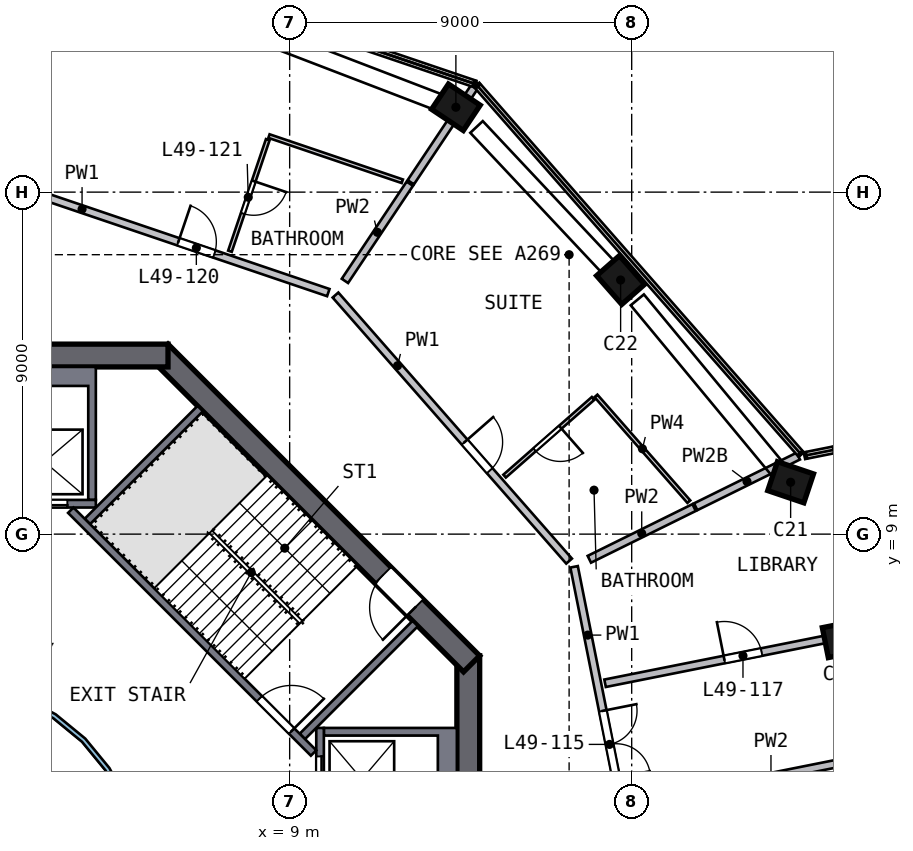
"""IFC4 building model, lengths in metres.
Left out: names, types, materials, properties, quantities, classifications, styles, units other than length and angle.
Written with IfcOpenShell. Run it as: python <this file> out.ifc"""

import sys

from ifc_helpers import new_model, si_unit, direction, frame, frame_2d, origin, origin_2d, place, context, subcontext, project, spatial, polyline, rectangle, outline, extrude, element, fill, save


model = new_model("IFC4")
c1 = context("Model", 3, precision=1e-05, world=origin(), true_north=direction((0.0, 1.0)))
c2 = subcontext(c1, "Body", "Model", "MODEL_VIEW")
j1 = project(units=[si_unit("LENGTHUNIT", "METRE"), si_unit("PLANEANGLEUNIT", "RADIAN")], contexts=[c1])
p1 = place(None, origin())
s1 = spatial("IfcSite", under=j1, at=p1, CompositionType="ELEMENT")
p2 = place(p1, origin())
s2 = spatial("IfcBuilding", under=s1, at=p2, CompositionType="ELEMENT")
p3 = place(p2, frame((0.0, 0.0, 201.0)))
s3 = spatial("IfcBuildingStorey", under=s2, at=p3, CompositionType="ELEMENT", Elevation=201.0)
p4 = place(p3, frame((22.229, 10.266, 0.0), z_axis=(-0.038762421, 0.08210902, 0.99586926), x_axis=(0.946547309, -0.316367479, 0.062927024)))
e1 = element("IfcColumn", 1, at=p4, inside=s3, PredefinedType="COLUMN", context=c2, shape_type="SweptSolid", body=[
    extrude(rectangle(XDim=1.0, YDim=0.8, at=origin_2d()), origin(), (0.0, 0.0, 1.0), 4.207),
])
p5 = place(p3, frame((17.779, 15.608, 0.0), z_axis=(-0.058449937, 0.065415172, 0.996144799), x_axis=(-0.65742794, 0.748393953, -0.087721123)))
e2 = element("IfcColumn", 2, at=p5, inside=s3, PredefinedType="COLUMN", context=c2, shape_type="SweptSolid", body=[
    extrude(rectangle(XDim=1.0, YDim=0.8, at=origin_2d()), origin(), (0.0, 0.0, 1.0), 4.206),
])
p6 = place(p3, frame((13.465, 20.174, 0.0), z_axis=(-0.075209821, 0.049269396, 0.995949803), x_axis=(0.828464484, -0.552777696, 0.089907833)))
e3 = element("IfcColumn", 3, at=p6, inside=s3, PredefinedType="COLUMN", context=c2, shape_type="SweptSolid", body=[
    extrude(rectangle(XDim=1.0, YDim=0.8, at=origin_2d()), origin(), (0.0, 0.0, 1.0), 4.207),
])
p7 = place(p3, frame((23.516, 6.118, 0.0), z_axis=(-0.02338665, 0.086989054, 0.995934721), x_axis=(0.980612873, 0.195865659, 0.005919145)))
e4 = element("IfcColumn", 4, at=p7, inside=s3, PredefinedType="COLUMN", context=c2, shape_type="SweptSolid", body=[
    extrude(rectangle(XDim=0.8, YDim=0.8, at=origin_2d()), origin(), (0.0, 0.0, 1.0), 4.207),
])
p8 = place(p3, frame((13.7, -5.799, 0.0), z_axis=(0.0, 0.0, 1.0), x_axis=(0.0, 1.0, 0.0)))
e5 = element("IfcWall", 5, at=p8, inside=s3, PredefinedType="SHEAR", context=c2, shape_type="SweptSolid", body=[
    extrude(rectangle(XDim=11.598, YDim=0.6, at=frame_2d((5.799, 0.0))), origin(), (0.0, 0.0, 1.0), 4.5),
])
p9 = place(p8, frame((4.899, 0.0, 0.0)))
e6 = element("IfcOpeningElement", 6, at=p9, cuts=e5, PredefinedType="OPENING", context=c2, shape_type="SweptSolid", body=[
    extrude(rectangle(XDim=1.8, YDim=2.1, at=frame_2d((0.9, 1.05))), frame((0.0, 0.31, 0.0), z_axis=(0.0, -1.0, 0.0), x_axis=(1.0, 0.0, 0.0)), (0.0, 0.0, 1.0), 0.62),
])
p10 = place(p3, frame((13.788, 5.587, 0.0), z_axis=(0.0, 0.0, 1.0), x_axis=(-0.707106781, 0.707106781, 0.0)))
e7 = element("IfcWall", 7, at=p10, inside=s3, PredefinedType="SHEAR", context=c2, shape_type="SweptSolid", body=[
    extrude(rectangle(XDim=11.598, YDim=0.6, at=frame_2d((5.799, 0.0))), origin(), (0.0, 0.0, 1.0), 4.5),
])
p11 = place(p10, frame((2.099, 0.0, 0.0)))
e8 = element("IfcOpeningElement", 8, at=p11, cuts=e7, PredefinedType="OPENING", context=c2, shape_type="SweptSolid", body=[
    extrude(rectangle(XDim=1.2, YDim=2.1, at=frame_2d((0.6, 1.05))), frame((0.0, 0.31, 0.0), z_axis=(0.0, -1.0, 0.0), x_axis=(1.0, 0.0, 0.0)), (0.0, 0.0, 1.0), 0.62),
])
p12 = place(p3, frame((5.799, 13.7, 0.0), z_axis=(0.0, 0.0, 1.0), x_axis=(-1.0, 0.0, 0.0)))
e9 = element("IfcWall", 9, at=p12, inside=s3, PredefinedType="SHEAR", context=c2, shape_type="SweptSolid", body=[
    extrude(rectangle(XDim=11.598, YDim=0.6, at=frame_2d((5.799, 0.0))), origin(), (0.0, 0.0, 1.0), 4.5),
])
p13 = place(p12, frame((4.899, 0.0, 0.0)))
e10 = element("IfcOpeningElement", 10, at=p13, cuts=e9, PredefinedType="OPENING", context=c2, shape_type="SweptSolid", body=[
    extrude(rectangle(XDim=1.8, YDim=2.1, at=frame_2d((0.9, 1.05))), frame((0.0, 0.31, 0.0), z_axis=(0.0, -1.0, 0.0), x_axis=(1.0, 0.0, 0.0)), (0.0, 0.0, 1.0), 0.62),
])
p14 = place(p3, origin())
e11 = element("IfcWall", 11, at=p14, inside=s3, PredefinedType="SOLIDWALL", context=c2, shape_type="SweptSolid", body=[
    extrude(outline(polyline([(13.4, 3.9), (13.4, 1.2), (9.9, 1.2), (9.9, 1.4), (12.9, 1.4), (12.9, 3.7), (9.9, 3.7), (9.9, 3.9), (13.4, 3.9)])), origin(), (0.0, 0.0, 1.0), 4.19),
])
p15 = place(p3, frame((9.8, 1.2, 0.0), z_axis=(0.0, 0.0, 1.0), x_axis=(0.0, 1.0, 0.0)))
e12 = element("IfcWall", 12, at=p15, inside=s3, PredefinedType="SOLIDWALL", context=c2, shape_type="SweptSolid", body=[
    extrude(rectangle(XDim=2.7, YDim=0.2, at=frame_2d((1.35, 0.0))), origin(), (0.0, 0.0, 1.0), 4.19),
])
p16 = place(p15, frame((0.75, 0.0, 0.0)))
e13 = element("IfcOpeningElement", 13, at=p16, cuts=e12, PredefinedType="OPENING", context=c2, shape_type="SweptSolid", body=[
    extrude(rectangle(XDim=1.2, YDim=2.1, at=frame_2d((0.6, 1.05))), frame((0.0, 0.11, 0.0), z_axis=(0.0, -1.0, 0.0), x_axis=(1.0, 0.0, 0.0)), (0.0, 0.0, 1.0), 0.22),
])
p17 = place(p3, origin())
e14 = element("IfcWall", 14, at=p17, inside=s3, PredefinedType="SOLIDWALL", context=c2, shape_type="SweptSolid", body=[
    extrude(outline(polyline([(3.9, 9.9), (3.7, 9.9), (3.7, 12.9), (1.4, 12.9), (1.4, 9.9), (1.2, 9.9), (1.2, 13.4), (3.9, 13.4), (3.9, 9.9)])), origin(), (0.0, 0.0, 1.0), 4.19),
])
p18 = place(p3, frame((1.2, 9.8, 0.0), z_axis=(0.0, 0.0, 1.0), x_axis=(1.0, 0.0, 0.0)))
e15 = element("IfcWall", 15, at=p18, inside=s3, PredefinedType="SOLIDWALL", context=c2, shape_type="SweptSolid", body=[
    extrude(rectangle(XDim=2.7, YDim=0.2, at=frame_2d((1.35, 0.0))), origin(), (0.0, 0.0, 1.0), 4.19),
])
p19 = place(p18, frame((0.75, 0.0, 0.0)))
e16 = element("IfcOpeningElement", 16, at=p19, cuts=e15, PredefinedType="OPENING", context=c2, shape_type="SweptSolid", body=[
    extrude(rectangle(XDim=1.2, YDim=2.1, at=frame_2d((0.6, 1.05))), frame((0.0, 0.11, 0.0), z_axis=(0.0, -1.0, 0.0), x_axis=(1.0, 0.0, 0.0)), (0.0, 0.0, 1.0), 0.22),
])
p20 = place(p3, frame((3.24, 9.629, 0.0), z_axis=(0.0, 0.0, 1.0), x_axis=(0.707106781, -0.707106781, 0.0)))
e17 = element("IfcWall", 17, at=p20, inside=s3, PredefinedType="SOLIDWALL", context=c2, shape_type="SweptSolid", body=[
    extrude(rectangle(XDim=9.036, YDim=0.2, at=frame_2d((4.518, 0.0))), origin(), (0.0, 0.0, 1.0), 4.19),
])
p21 = place(p20, frame((7.018, 0.0, 0.0)))
e18 = element("IfcOpeningElement", 18, at=p21, cuts=e17, PredefinedType="OPENING", context=c2, shape_type="SweptSolid", body=[
    extrude(rectangle(XDim=1.2, YDim=2.1, at=frame_2d((0.6, 1.05))), frame((0.0, 0.11, 0.0), z_axis=(0.0, -1.0, 0.0), x_axis=(1.0, 0.0, 0.0)), (0.0, 0.0, 1.0), 0.22),
])
for number, where, z_axis, x_axis in (
    (19, (9.334, 3.677, 0.0), (0.0, 0.0, 1.0), (0.707, 0.707, 0.0)),
    (20, (3.677, 9.334, 0.0), (0.0, 0.0, 1.0), (0.707, 0.707, 0.0)),
):
    element("IfcWall", number, at=place(p3, frame(where, z_axis=z_axis, x_axis=x_axis)), inside=s3, PredefinedType="SOLIDWALL", context=c2, shape_type="SweptSolid", body=[
        extrude(rectangle(XDim=4.2, YDim=0.2, at=frame_2d((2.1, 0.0))), origin(), (0.0, 0.0, 1.0), 4.19),
    ])
p22 = place(p3, origin())
e21 = element("IfcWall", 21, at=p22, inside=s3, PredefinedType="SOLIDWALL", context=c2, shape_type="SweptSolid", body=[
    extrude(outline(polyline([(5.021, -0.999), (4.73, -1.959), (4.257, -2.844), (3.62, -3.62), (2.844, -4.257), (1.959, -4.73), (0.999, -5.021), (0.0, -5.12), (-0.999, -5.021), (-1.959, -4.73), (-2.844, -4.257), (-3.62, -3.62), (-4.257, -2.844), (-4.73, -1.959), (-5.021, -0.999), (-5.12, 0.0), (-5.021, 0.999), (-4.73, 1.959), (-4.257, 2.844), (-3.62, 3.62), (-2.844, 4.257), (-1.959, 4.73), (-0.999, 5.021), (0.0, 5.12), (0.999, 5.021), (1.959, 4.73), (2.844, 4.257), (3.62, 3.62), (4.257, 2.844), (4.73, 1.959), (5.021, 0.999), (5.12, 0.0), (5.021, -0.999)]), holes=[polyline([(4.904, 0.976), (4.619, 1.913), (4.157, 2.778), (3.535, 3.535), (2.778, 4.157), (1.913, 4.619), (0.976, 4.904), (0.0, 5.0), (-0.976, 4.904), (-1.913, 4.619), (-2.778, 4.157), (-3.535, 3.535), (-4.157, 2.778), (-4.619, 1.913), (-4.904, 0.976), (-5.0, 0.0), (-4.904, -0.976), (-4.619, -1.913), (-4.157, -2.778), (-3.535, -3.535), (-2.778, -4.157), (-1.913, -4.619), (-0.976, -4.904), (0.0, -5.0), (0.976, -4.904), (1.913, -4.619), (2.778, -4.157), (3.535, -3.535), (4.157, -2.778), (4.619, -1.913), (4.904, -0.976), (5.0, 0.0), (4.904, 0.976)])]), origin(), (0.0, 0.0, 1.0), 4.19),
])
p23 = place(p3, frame((1.193, 18.346, 0.0), z_axis=(0.0, 0.0, 1.0), x_axis=(0.947096531, -0.320948844, 0.0)))
e22 = element("IfcWall", 22, at=p23, inside=s3, PredefinedType="SOLIDWALL", context=c2, shape_type="SweptSolid", body=[
    extrude(rectangle(XDim=9.316, YDim=0.2, at=frame_2d((4.658, 0.0))), origin(), (0.0, 0.0, 1.0), 4.19),
])
p24 = place(p23, frame((5.15, 0.0, 0.0)))
e23 = element("IfcOpeningElement", 23, at=p24, cuts=e22, PredefinedType="OPENING", context=c2, shape_type="SweptSolid", body=[
    extrude(rectangle(XDim=1.0, YDim=2.1, at=frame_2d((0.5, 1.05))), frame((0.0, 0.11, 0.0), z_axis=(0.0, -1.0, 0.0), x_axis=(1.0, 0.0, 0.0)), (0.0, 0.0, 1.0), 0.22),
])
p25 = place(p3, frame((10.206, 15.292, 0.0), z_axis=(0.0, 0.0, 1.0), x_axis=(0.659731878, -0.751501064, 0.0)))
e24 = element("IfcWall", 24, at=p25, inside=s3, PredefinedType="SOLIDWALL", context=c2, shape_type="SweptSolid", body=[
    extrude(rectangle(XDim=9.317, YDim=0.2, at=frame_2d((4.658, 0.0))), origin(), (0.0, 0.0, 1.0), 4.19),
])
p26 = place(p25, frame((5.15, 0.0, 0.0)))
e25 = element("IfcOpeningElement", 25, at=p26, cuts=e24, PredefinedType="OPENING", context=c2, shape_type="SweptSolid", body=[
    extrude(rectangle(XDim=1.0, YDim=2.1, at=frame_2d((0.5, 1.05))), frame((0.0, 0.11, 0.0), z_axis=(0.0, -1.0, 0.0), x_axis=(1.0, 0.0, 0.0)), (0.0, 0.0, 1.0), 0.22),
])
p27 = place(p3, frame((16.485, 8.14, 0.0), z_axis=(0.0, 0.0, 1.0), x_axis=(0.195597039, -0.980684352, 0.0)))
e26 = element("IfcWall", 26, at=p27, inside=s3, PredefinedType="SOLIDWALL", context=c2, shape_type="SweptSolid", body=[
    extrude(rectangle(XDim=9.316, YDim=0.2, at=frame_2d((4.658, 0.0))), origin(), (0.0, 0.0, 1.0), 4.19),
])
p28 = place(p27, frame((3.865, 0.0, 0.0)))
e27 = element("IfcOpeningElement", 27, at=p28, cuts=e26, PredefinedType="OPENING", context=c2, shape_type="SweptSolid", body=[
    extrude(rectangle(XDim=1.8, YDim=2.1, at=frame_2d((0.9, 1.05))), frame((0.0, 0.11, 0.0), z_axis=(0.0, -1.0, 0.0), x_axis=(1.0, 0.0, 0.0)), (0.0, 0.0, 1.0), 0.22),
])
p29 = place(p3, frame((10.454, 15.664, 0.0), z_axis=(0.0, 0.0, 1.0), x_axis=(0.555121583, 0.831769215, 0.0)))
e28 = element("IfcWall", 28, at=p29, inside=s3, PredefinedType="SOLIDWALL", context=c2, shape_type="SweptSolid", body=[
    extrude(rectangle(XDim=3.075, YDim=0.2, at=frame_2d((1.537, 0.0))), origin(), (0.0, 0.0, 1.0), 4.19),
])
p30 = place(p3, frame((12.187, 18.259, 0.0), z_axis=(0.0, 0.0, 1.0), x_axis=(0.555093017, 0.83178828, 0.0)))
e29 = element("IfcWall", 29, at=p30, inside=s3, PredefinedType="SOLIDWALL", context=c2, shape_type="SweptSolid", body=[
    extrude(rectangle(XDim=3.011, YDim=0.2, at=frame_2d((1.506, 0.0))), origin(), (0.0, 0.0, 1.0), 4.19),
])
p31 = place(p3, frame((16.885, 8.338, 0.0), z_axis=(0.0, 0.0, 1.0), x_axis=(0.896623517, 0.442793709, 0.0)))
e30 = element("IfcWall", 30, at=p31, inside=s3, PredefinedType="SOLIDWALL", context=c2, shape_type="SweptSolid", body=[
    extrude(rectangle(XDim=3.075, YDim=0.2, at=frame_2d((1.538, 0.0))), origin(), (0.0, 0.0, 1.0), 4.19),
])
p32 = place(p3, frame((19.684, 9.72, 0.0), z_axis=(0.0, 0.0, 1.0), x_axis=(0.896653576, 0.442732837, 0.0)))
e31 = element("IfcWall", 31, at=p32, inside=s3, PredefinedType="SOLIDWALL", context=c2, shape_type="SweptSolid", body=[
    extrude(rectangle(XDim=3.011, YDim=0.2, at=frame_2d((1.506, 0.0))), origin(), (0.0, 0.0, 1.0), 3.69),
])
p33 = place(p3, frame((17.3, 5.075, 0.0), z_axis=(0.0, 0.0, 1.0), x_axis=(0.98068274, 0.195605123, 0.0)))
e32 = element("IfcWall", 32, at=p33, inside=s3, PredefinedType="SOLIDWALL", context=c2, shape_type="SweptSolid", body=[
    extrude(rectangle(XDim=10.75, YDim=0.2, at=frame_2d((5.375, 0.0))), origin(), (0.0, 0.0, 1.0), 4.19),
])
p34 = place(p33, frame((3.2, 0.0, 0.0)))
e33 = element("IfcOpeningElement", 33, at=p34, cuts=e32, PredefinedType="OPENING", context=c2, shape_type="SweptSolid", body=[
    extrude(rectangle(XDim=1.0, YDim=2.1, at=frame_2d((0.5, 1.05))), frame((0.0, 0.11, 0.0), z_axis=(0.0, -1.0, 0.0), x_axis=(1.0, 0.0, 0.0)), (0.0, 0.0, 1.0), 0.22),
])
p35 = place(p3, frame((28.481, 3.976, 0.0), z_axis=(0.0, 0.0, 1.0), x_axis=(-0.980677514, -0.195631322, 0.0)))
e34 = element("IfcWall", 34, at=p35, inside=s3, PredefinedType="SOLIDWALL", context=c2, shape_type="SweptSolid", body=[
    extrude(rectangle(XDim=10.75, YDim=0.2, at=frame_2d((5.375, 0.0))), origin(), (0.0, 0.0, 1.0), 4.19),
])
p36 = place(p35, frame((1.95, 0.0, 0.0)))
e35 = element("IfcOpeningElement", 35, at=p36, cuts=e34, PredefinedType="OPENING", context=c2, shape_type="SweptSolid", body=[
    extrude(rectangle(XDim=1.0, YDim=2.1, at=frame_2d((0.5, 1.05))), frame((0.0, 0.11, 0.0), z_axis=(0.0, -1.0, 0.0), x_axis=(1.0, 0.0, 0.0)), (0.0, 0.0, 1.0), 0.22),
])
p37 = place(p3, frame((8.424, 19.38, 0.0), z_axis=(0.0, 0.0, 1.0), x_axis=(-0.320949479, -0.947096316, 0.0)))
e36 = element("IfcWall", 36, at=p37, inside=s3, PredefinedType="PARTITIONING", context=c2, shape_type="SweptSolid", body=[
    extrude(rectangle(XDim=3.1, YDim=0.1, at=frame_2d((1.55, 0.0))), origin(), (0.0, 0.0, 1.0), 4.19),
])
p38 = place(p37, frame((1.15, 0.0, 0.0)))
e37 = element("IfcOpeningElement", 37, at=p38, cuts=e36, PredefinedType="OPENING", context=c2, shape_type="SweptSolid", body=[
    extrude(rectangle(XDim=0.9, YDim=2.1, at=frame_2d((0.45, 1.05))), frame((0.0, 0.06, 0.0), z_axis=(0.0, -1.0, 0.0), x_axis=(1.0, 0.0, 0.0)), (0.0, 0.0, 1.0), 0.12),
])
p39 = place(p3, frame((8.456, 19.475, 0.0), z_axis=(0.0, 0.0, 1.0), x_axis=(0.947109685, -0.320910025, 0.0)))
e38 = element("IfcWall", 38, at=p39, inside=s3, PredefinedType="PARTITIONING", context=c2, shape_type="SweptSolid", body=[
    extrude(rectangle(XDim=3.704, YDim=0.1, at=frame_2d((1.852, 0.0))), origin(), (0.0, 0.0, 1.0), 4.19),
])
p40 = place(p3, frame((16.985, 12.572, 0.0), z_axis=(0.0, 0.0, 1.0), x_axis=(-0.75152688, -0.65970247, 0.0)))
e39 = element("IfcWall", 39, at=p40, inside=s3, PredefinedType="PARTITIONING", context=c2, shape_type="SweptSolid", body=[
    extrude(rectangle(XDim=3.1, YDim=0.1, at=frame_2d((1.55, 0.0))), origin(), (0.0, 0.0, 1.0), 4.19),
])
p41 = place(p40, frame((1.15, 0.0, 0.0)))
e40 = element("IfcOpeningElement", 40, at=p41, cuts=e39, PredefinedType="OPENING", context=c2, shape_type="SweptSolid", body=[
    extrude(rectangle(XDim=0.9, YDim=2.1, at=frame_2d((0.45, 1.05))), frame((0.0, 0.06, 0.0), z_axis=(0.0, -1.0, 0.0), x_axis=(1.0, 0.0, 0.0)), (0.0, 0.0, 1.0), 0.12),
])
p42 = place(p3, frame((17.06, 12.638, 0.0), z_axis=(0.0, 0.0, 1.0), x_axis=(0.659744893, -0.751489638, 0.0)))
e41 = element("IfcWall", 41, at=p42, inside=s3, PredefinedType="PARTITIONING", context=c2, shape_type="SweptSolid", body=[
    extrude(rectangle(XDim=3.704, YDim=0.1, at=frame_2d((1.852, 0.0))), origin(), (0.0, 0.0, 1.0), 4.19),
])
p43 = place(p16, origin())
e42 = element("IfcDoor", 42, at=p43, inside=s3, OperationType="DOUBLE_DOOR_SLIDING", PredefinedType="DOOR", context=c2, shape_type="SweptSolid", body=[
    extrude(rectangle(XDim=1.2, YDim=2.1, at=frame_2d((0.6, 1.05))), frame((0.0, 0.025, 0.0), z_axis=(0.0, -1.0, 0.0), x_axis=(1.0, 0.0, 0.0)), (0.0, 0.0, 1.0), 0.05),
])
fill(e13, e42)
p44 = place(p19, origin())
e43 = element("IfcDoor", 43, at=p44, inside=s3, OperationType="DOUBLE_DOOR_SLIDING", PredefinedType="DOOR", context=c2, shape_type="SweptSolid", body=[
    extrude(rectangle(XDim=1.2, YDim=2.1, at=frame_2d((0.6, 1.05))), frame((0.0, 0.025, 0.0), z_axis=(0.0, -1.0, 0.0), x_axis=(1.0, 0.0, 0.0)), (0.0, 0.0, 1.0), 0.05),
])
fill(e16, e43)
p45 = place(p21, origin())
e44 = element("IfcDoor", 44, at=p45, inside=s3, OperationType="SINGLE_SWING_RIGHT", PredefinedType="DOOR", context=c2, shape_type="SweptSolid", body=[
    extrude(rectangle(XDim=1.2, YDim=2.1, at=frame_2d((0.6, 1.05))), frame((0.0, 0.025, 0.0), z_axis=(0.0, -1.0, 0.0), x_axis=(1.0, 0.0, 0.0)), (0.0, 0.0, 1.0), 0.05),
])
fill(e18, e44)
p46 = place(p11, origin())
e45 = element("IfcDoor", 45, at=p46, inside=s3, OperationType="SINGLE_SWING_LEFT", PredefinedType="DOOR", context=c2, shape_type="SweptSolid", body=[
    extrude(rectangle(XDim=1.2, YDim=2.1, at=frame_2d((0.6, 1.05))), frame((0.0, 0.025, 0.0), z_axis=(0.0, -1.0, 0.0), x_axis=(1.0, 0.0, 0.0)), (0.0, 0.0, 1.0), 0.05),
])
fill(e8, e45)
p47 = place(p28, origin())
e46 = element("IfcDoor", 46, at=p47, inside=s3, OperationType="DOUBLE_DOOR_SINGLE_SWING", PredefinedType="DOOR", context=c2, shape_type="SweptSolid", body=[
    extrude(rectangle(XDim=1.8, YDim=2.1, at=frame_2d((0.9, 1.05))), frame((0.0, 0.025, 0.0), z_axis=(0.0, -1.0, 0.0), x_axis=(1.0, 0.0, 0.0)), (0.0, 0.0, 1.0), 0.05),
])
fill(e27, e46)
p48 = place(p34, origin())
e47 = element("IfcDoor", 47, at=p48, inside=s3, OperationType="SINGLE_SWING_LEFT", PredefinedType="DOOR", context=c2, shape_type="SweptSolid", body=[
    extrude(rectangle(XDim=1.0, YDim=2.1, at=frame_2d((0.5, 1.05))), frame((0.0, 0.025, 0.0), z_axis=(0.0, -1.0, 0.0), x_axis=(1.0, 0.0, 0.0)), (0.0, 0.0, 1.0), 0.05),
])
fill(e33, e47)
p49 = place(p26, origin())
e48 = element("IfcDoor", 48, at=p49, inside=s3, OperationType="SINGLE_SWING_LEFT", PredefinedType="DOOR", context=c2, shape_type="SweptSolid", body=[
    extrude(rectangle(XDim=1.0, YDim=2.1, at=frame_2d((0.5, 1.05))), frame((0.0, 0.025, 0.0), z_axis=(0.0, -1.0, 0.0), x_axis=(1.0, 0.0, 0.0)), (0.0, 0.0, 1.0), 0.05),
])
fill(e25, e48)
p50 = place(p41, origin())
e49 = element("IfcDoor", 49, at=p50, inside=s3, OperationType="SINGLE_SWING_LEFT", PredefinedType="DOOR", context=c2, shape_type="SweptSolid", body=[
    extrude(rectangle(XDim=0.9, YDim=2.1, at=frame_2d((0.45, 1.05))), frame((0.0, 0.025, 0.0), z_axis=(0.0, -1.0, 0.0), x_axis=(1.0, 0.0, 0.0)), (0.0, 0.0, 1.0), 0.05),
])
fill(e40, e49)
p51 = place(p24, origin())
e50 = element("IfcDoor", 50, at=p51, inside=s3, OperationType="SINGLE_SWING_LEFT", PredefinedType="DOOR", context=c2, shape_type="SweptSolid", body=[
    extrude(rectangle(XDim=1.0, YDim=2.1, at=frame_2d((0.5, 1.05))), frame((0.0, 0.025, 0.0), z_axis=(0.0, -1.0, 0.0), x_axis=(1.0, 0.0, 0.0)), (0.0, 0.0, 1.0), 0.05),
])
fill(e23, e50)
p52 = place(p38, origin())
e51 = element("IfcDoor", 51, at=p52, inside=s3, OperationType="SINGLE_SWING_LEFT", PredefinedType="DOOR", context=c2, shape_type="SweptSolid", body=[
    extrude(rectangle(XDim=0.9, YDim=2.1, at=frame_2d((0.45, 1.05))), frame((0.0, 0.025, 0.0), z_axis=(0.0, -1.0, 0.0), x_axis=(1.0, 0.0, 0.0)), (0.0, 0.0, 1.0), 0.05),
])
fill(e37, e51)
save(model, sys.argv[1])
